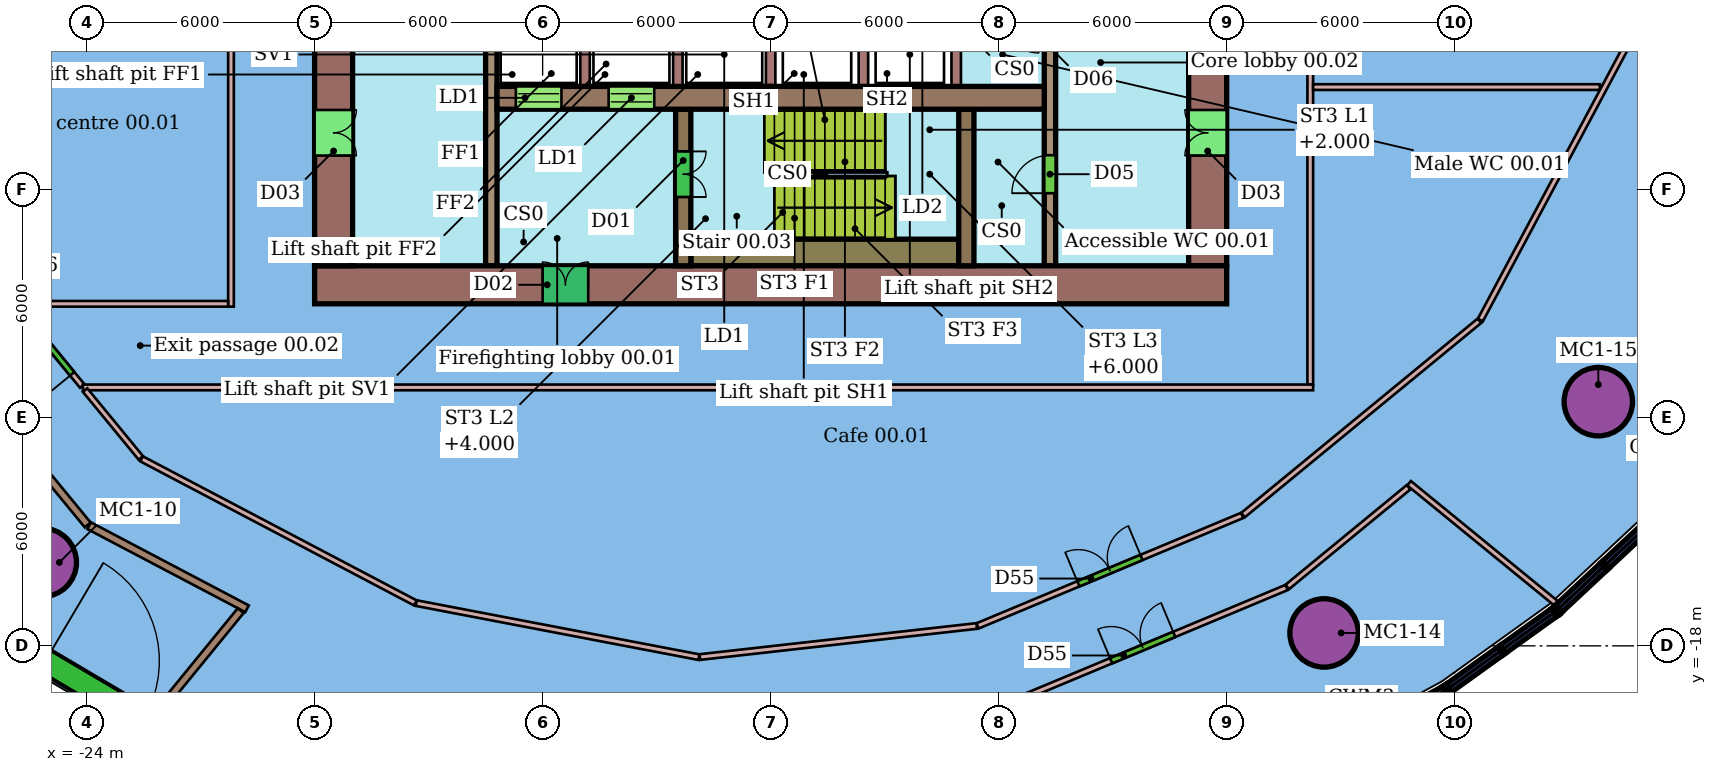
"""IFC4 building model, lengths in metres.
Left out: names, types, materials, properties, quantities, classifications, styles, units other than length and angle.
Written with IfcOpenShell. Run it as: python <this file> out.ifc"""

import sys

from ifc_helpers import new_model, si_unit, direction, frame, frame_2d, origin, origin_2d, place, context, subcontext, project, spatial, rectangle, hollow_circle, extrude, element, fill, save


model = new_model("IFC4")
c1 = context("Model", 3, precision=1e-05, world=origin(), true_north=direction((0.0, 1.0)))
c2 = subcontext(c1, "Body", "Model", "MODEL_VIEW")
j1 = project(units=[si_unit("LENGTHUNIT", "METRE"), si_unit("PLANEANGLEUNIT", "RADIAN")], contexts=[c1])
p1 = place(None, origin())
s1 = spatial("IfcSite", under=j1, at=p1, CompositionType="ELEMENT")
p2 = place(p1, origin())
s2 = spatial("IfcBuilding", under=s1, at=p2, CompositionType="ELEMENT")
p3 = place(p2, origin())
s3 = spatial("IfcBuildingStorey", under=s2, at=p3, CompositionType="ELEMENT", Elevation=0.0)
for number, where, z_axis, x_axis in (
    (1, (-25.166, -15.805, -2.0), (0.0, 0.0, 1.0), (1.0, 0.0, 0.0)),
    (2, (8.563, -17.66, -2.0), (0.0, 0.0, 1.0), (1.0, 0.0, 0.0)),
    (3, (15.78, -11.576, -2.0), (0.0, 0.0, 1.0), (1.0, 0.0, 0.0)),
):
    element("IfcColumn", number, at=place(p3, frame(where, z_axis=z_axis, x_axis=x_axis)), inside=s3, PredefinedType="COLUMN", context=c2, shape_type="SweptSolid", body=[
        extrude(hollow_circle(Radius=0.9, WallThickness=0.06, at=origin_2d()), origin(), (0.0, 0.0, 1.0), 9.8),
    ])
for number, where, z_axis, x_axis in (
    (4, (-20.2, -9.075, 0.0), (0.0, 0.0, 1.0), (0.0, 1.0, 0.0)),
    (5, (8.2, -11.125, 0.0), (0.0, 0.0, 1.0), (0.0, 1.0, 0.0)),
):
    element("IfcWall", number, at=place(p3, frame(where, z_axis=z_axis, x_axis=x_axis)), inside=s3, PredefinedType="PARTITIONING", context=c2, shape_type="SweptSolid", body=[
        extrude(rectangle(XDim=20.2, YDim=0.15, at=frame_2d((10.1, 0.0))), origin(), (0.0, 0.0, 1.0), 7.35),
    ])
p4 = place(p3, frame((-24.097, -11.2, 0.0), z_axis=(0.0, 0.0, 1.0), x_axis=(1.0, 0.0, 0.0)))
e6 = element("IfcWall", 6, at=p4, inside=s3, PredefinedType="PARTITIONING", context=c2, shape_type="SweptSolid", body=[
    extrude(rectangle(XDim=32.372, YDim=0.15, at=frame_2d((16.186, 0.0))), origin(), (0.0, 0.0, 1.0), 7.35),
])
p5 = place(p3, frame((-25.906, -9.0, 0.0), z_axis=(0.0, 0.0, 1.0), x_axis=(1.0, 0.0, 0.0)))
e7 = element("IfcWall", 7, at=p5, inside=s3, PredefinedType="PARTITIONING", context=c2, shape_type="SweptSolid", body=[
    extrude(rectangle(XDim=5.631, YDim=0.15, at=frame_2d((2.815, 0.0))), origin(), (0.0, 0.0, 1.0), 7.35),
])
p6 = place(p3, frame((-24.039, -11.271, 0.0), z_axis=(0.0, 0.0, 1.0), x_axis=(0.634980634047, -0.772528054109, 0.0)))
e8 = element("IfcWall", 8, at=p6, inside=s3, PredefinedType="PARTITIONING", context=c2, shape_type="SweptSolid", body=[
    extrude(rectangle(XDim=2.309, YDim=0.15, at=frame_2d((1.155, 0.0))), origin(), (0.0, 0.0, 1.0), 7.35),
])
p7 = place(p3, frame((8.275, -3.298, 0.0), z_axis=(0.0, 0.0, 1.0), x_axis=(1.0, 0.0, 0.0)))
e9 = element("IfcWall", 9, at=p7, inside=s3, PredefinedType="PARTITIONING", context=c2, shape_type="SweptSolid", body=[
    extrude(rectangle(XDim=7.546, YDim=0.15, at=frame_2d((3.773, 0.0))), origin(), (0.0, 0.0, 1.0), 7.35),
])
p8 = place(p3, frame((-0.553, -17.475, 0.0), z_axis=(0.0, 0.0, 1.0), x_axis=(0.922821127206, 0.38522872061, 0.0)))
e10 = element("IfcWall", 10, at=p8, inside=s3, PredefinedType="PARTITIONING", context=c2, shape_type="SweptSolid", body=[
    extrude(rectangle(XDim=7.545, YDim=0.15, at=frame_2d((3.773, 0.0))), origin(), (0.0, 0.0, 1.0), 7.35),
])
p9 = place(p8, frame((2.873, 0.0, 0.0)))
e11 = element("IfcOpeningElement", 11, at=p9, cuts=e10, PredefinedType="OPENING", context=c2, shape_type="SweptSolid", body=[
    extrude(rectangle(XDim=1.8, YDim=2.4, at=frame_2d((0.9, 1.2))), frame((0.0, 0.085, 0.0), z_axis=(0.0, -1.0, 0.0), x_axis=(1.0, 0.0, 0.0)), (0.0, 0.0, 1.0), 0.17),
])
p10 = place(p3, frame((-7.863, -18.295, 0.0), z_axis=(0.0, 0.0, 1.0), x_axis=(0.993762158865, 0.111520274427, 0.0)))
e12 = element("IfcWall", 12, at=p10, inside=s3, PredefinedType="PARTITIONING", context=c2, shape_type="SweptSolid", body=[
    extrude(rectangle(XDim=7.334, YDim=0.15, at=frame_2d((3.667, 0.0))), origin(), (0.0, 0.0, 1.0), 7.35),
])
p11 = place(p3, frame((-15.325, -16.875, 0.0), z_axis=(0.0, 0.0, 1.0), x_axis=(0.982205706766, -0.187808278828, 0.0)))
e13 = element("IfcWall", 13, at=p11, inside=s3, PredefinedType="PARTITIONING", context=c2, shape_type="SweptSolid", body=[
    extrude(rectangle(XDim=7.573, YDim=0.15, at=frame_2d((3.787, 0.0))), origin(), (0.0, 0.0, 1.0), 7.35),
])
p12 = place(p3, frame((-22.553, -13.079, 0.0), z_axis=(0.0, 0.0, 1.0), x_axis=(0.884926027541, -0.46573160273, 0.0)))
e14 = element("IfcWall", 14, at=p12, inside=s3, PredefinedType="PARTITIONING", context=c2, shape_type="SweptSolid", body=[
    extrude(rectangle(XDim=8.142, YDim=0.15, at=frame_2d((4.071, 0.0))), origin(), (0.0, 0.0, 1.0), 7.35),
])
p13 = place(p3, frame((12.676, -9.427, 0.0), z_axis=(0.0, 0.0, 1.0), x_axis=(0.470743396375, 0.882270171076, 0.0)))
e15 = element("IfcWall", 15, at=p13, inside=s3, PredefinedType="PARTITIONING", context=c2, shape_type="SweptSolid", body=[
    extrude(rectangle(XDim=8.493, YDim=0.15, at=frame_2d((4.247, 0.0))), origin(), (0.0, 0.0, 1.0), 7.35),
])
p14 = place(p3, frame((6.431, -14.559, 0.0), z_axis=(0.0, 0.0, 1.0), x_axis=(0.772569565922, 0.634930126716, 0.0)))
e16 = element("IfcWall", 16, at=p14, inside=s3, PredefinedType="PARTITIONING", context=c2, shape_type="SweptSolid", body=[
    extrude(rectangle(XDim=8.053, YDim=0.15, at=frame_2d((4.026, 0.0))), origin(), (0.0, 0.0, 1.0), 7.35),
])
p15 = place(p3, frame((-30.093, -7.371, 0.0), z_axis=(0.0, 0.0, 1.0), x_axis=(0.635024486896, -0.772492007106, 0.0)))
e17 = element("IfcWall", 17, at=p15, inside=s3, PredefinedType="PARTITIONING", context=c2, shape_type="SweptSolid", body=[
    extrude(rectangle(XDim=9.642, YDim=0.2, at=frame_2d((4.821, 0.0))), origin(), (0.0, 0.0, 1.0), 7.35),
])
p16 = place(p3, frame((-23.933, -14.839, 0.0), z_axis=(0.0, 0.0, 1.0), x_axis=(0.884946422315, -0.465692849023, 0.0)))
e18 = element("IfcWall", 18, at=p16, inside=s3, PredefinedType="PARTITIONING", context=c2, shape_type="SweptSolid", body=[
    extrude(rectangle(XDim=4.695, YDim=0.2, at=frame_2d((2.347, 0.0))), origin(), (0.0, 0.0, 1.0), 7.35),
])
p17 = place(p3, frame((-22.156, -19.781, 0.0), z_axis=(0.0, 0.0, 1.0), x_axis=(0.632598795389, 0.774479673118, 0.0)))
e19 = element("IfcWall", 19, at=p17, inside=s3, PredefinedType="PARTITIONING", context=c2, shape_type="SweptSolid", body=[
    extrude(rectangle(XDim=3.497, YDim=0.2, at=frame_2d((1.748, 0.0))), origin(), (0.0, 0.0, 1.0), 7.35),
])
p18 = place(p3, frame((0.004, -19.626, 0.0), z_axis=(0.0, 0.0, 1.0), x_axis=(0.922823237456, 0.385223665436, 0.0)))
e20 = element("IfcWall", 20, at=p18, inside=s3, PredefinedType="PARTITIONING", context=c2, shape_type="SweptSolid", body=[
    extrude(rectangle(XDim=8.207, YDim=0.15, at=frame_2d((4.103, 0.0))), origin(), (0.0, 0.0, 1.0), 7.35),
])
p19 = place(p18, frame((3.203, 0.0, 0.0)))
e21 = element("IfcOpeningElement", 21, at=p19, cuts=e20, PredefinedType="OPENING", context=c2, shape_type="SweptSolid", body=[
    extrude(rectangle(XDim=1.8, YDim=2.4, at=frame_2d((0.9, 1.2))), frame((0.0, 0.085, 0.0), z_axis=(0.0, -1.0, 0.0), x_axis=(1.0, 0.0, 0.0)), (0.0, 0.0, 1.0), 0.17),
])
p20 = place(p3, frame((7.594, -16.45, 0.0), z_axis=(0.0, 0.0, 1.0), x_axis=(0.772605153206, 0.634886822386, 0.0)))
e22 = element("IfcWall", 22, at=p20, inside=s3, PredefinedType="PARTITIONING", context=c2, shape_type="SweptSolid", body=[
    extrude(rectangle(XDim=4.132, YDim=0.15, at=frame_2d((2.066, 0.0))), origin(), (0.0, 0.0, 1.0), 7.35),
])
p21 = place(p3, frame((10.8, -13.721, 0.0), z_axis=(0.0, 0.0, 1.0), x_axis=(0.774493289837, -0.63258212431, 0.0)))
e23 = element("IfcWall", 23, at=p21, inside=s3, PredefinedType="PARTITIONING", context=c2, shape_type="SweptSolid", body=[
    extrude(rectangle(XDim=5.03, YDim=0.15, at=frame_2d((2.515, 0.0))), origin(), (0.0, 0.0, 1.0), 7.35),
])
p22 = place(p3, frame((-25.671, -18.053, 0.0), z_axis=(0.0, 0.0, 1.0), x_axis=(0.861017868942, -0.508574703818, 0.0)))
e24 = element("IfcWall", 24, at=p22, inside=s3, PredefinedType="SOLIDWALL", context=c2, shape_type="SweptSolid", body=[
    extrude(rectangle(XDim=4.363, YDim=0.6, at=frame_2d((2.181, 0.0))), origin(), (0.0, 0.0, 1.0), 7.4),
])
p23 = place(p22, frame((0.681, 0.0, 0.0)))
e25 = element("IfcOpeningElement", 25, at=p23, cuts=e24, PredefinedType="OPENING", context=c2, shape_type="SweptSolid", body=[
    extrude(rectangle(XDim=3.0, YDim=3.5, at=frame_2d((1.5, 1.75))), frame((0.0, 0.31, 0.0), z_axis=(0.0, -1.0, 0.0), x_axis=(1.0, 0.0, 0.0)), (0.0, 0.0, 1.0), 0.62),
])
p24 = place(p3, frame((-18.0, -8.5, -2.0), z_axis=(0.0, 0.0, 1.0), x_axis=(1.0, 0.0, 0.0)))
e26 = element("IfcWall", 26, at=p24, inside=s3, PredefinedType="SHEAR", context=c2, shape_type="SweptSolid", body=[
    extrude(rectangle(XDim=24.0, YDim=1.0, at=frame_2d((12.0, 0.0))), origin(), (0.0, 0.0, 1.0), 9.7),
])
p25 = place(p24, frame((6.0, 0.0, 2.0)))
e27 = element("IfcOpeningElement", 27, at=p25, cuts=e26, PredefinedType="OPENING", context=c2, shape_type="SweptSolid", body=[
    extrude(rectangle(XDim=1.2, YDim=2.1, at=frame_2d((0.6, 1.05))), frame((0.0, 0.51, 0.0), z_axis=(0.0, -1.0, 0.0), x_axis=(1.0, 0.0, 0.0)), (0.0, 0.0, 1.0), 1.02),
])
p26 = place(p3, frame((-17.5, 8.0, -2.0), z_axis=(0.0, 0.0, 1.0), x_axis=(0.0, -1.0, 0.0)))
e28 = element("IfcWall", 28, at=p26, inside=s3, PredefinedType="SHEAR", context=c2, shape_type="SweptSolid", body=[
    extrude(rectangle(XDim=16.0, YDim=1.0, at=frame_2d((8.0, 0.0))), origin(), (0.0, 0.0, 1.0), 9.7),
])
p27 = place(p26, frame((11.9, 0.0, 2.0)))
e29 = element("IfcOpeningElement", 29, at=p27, cuts=e28, PredefinedType="OPENING", context=c2, shape_type="SweptSolid", body=[
    extrude(rectangle(XDim=1.2, YDim=2.1, at=frame_2d((0.6, 1.05))), frame((0.0, 0.51, 0.0), z_axis=(0.0, -1.0, 0.0), x_axis=(1.0, 0.0, 0.0)), (0.0, 0.0, 1.0), 1.02),
])
p28 = place(p26, frame((2.9, 0.0, 2.0)))
e30 = element("IfcOpeningElement", 30, at=p28, cuts=e28, PredefinedType="OPENING", context=c2, shape_type="SweptSolid", body=[
    extrude(rectangle(XDim=1.2, YDim=2.1, at=frame_2d((0.6, 1.05))), frame((0.0, 0.51, 0.0), z_axis=(0.0, -1.0, 0.0), x_axis=(1.0, 0.0, 0.0)), (0.0, 0.0, 1.0), 1.02),
])
p29 = place(p3, frame((5.5, -8.0, -2.0), z_axis=(0.0, 0.0, 1.0), x_axis=(0.0, 1.0, 0.0)))
e31 = element("IfcWall", 31, at=p29, inside=s3, PredefinedType="SHEAR", context=c2, shape_type="SweptSolid", body=[
    extrude(rectangle(XDim=16.0, YDim=1.0, at=frame_2d((8.0, 0.0))), origin(), (0.0, 0.0, 1.0), 9.7),
])
p30 = place(p29, frame((2.9, 0.0, 2.0)))
e32 = element("IfcOpeningElement", 32, at=p30, cuts=e31, PredefinedType="OPENING", context=c2, shape_type="SweptSolid", body=[
    extrude(rectangle(XDim=1.2, YDim=2.1, at=frame_2d((0.6, 1.05))), frame((0.0, 0.51, 0.0), z_axis=(0.0, -1.0, 0.0), x_axis=(1.0, 0.0, 0.0)), (0.0, 0.0, 1.0), 1.02),
])
p31 = place(p29, frame((11.9, 0.0, 2.0)))
e33 = element("IfcOpeningElement", 33, at=p31, cuts=e31, PredefinedType="OPENING", context=c2, shape_type="SweptSolid", body=[
    extrude(rectangle(XDim=1.2, YDim=2.1, at=frame_2d((0.6, 1.05))), frame((0.0, 0.51, 0.0), z_axis=(0.0, -1.0, 0.0), x_axis=(1.0, 0.0, 0.0)), (0.0, 0.0, 1.0), 1.02),
])
p32 = place(p3, frame((-13.2, -3.58, -2.0), z_axis=(0.0, 0.0, 1.0), x_axis=(1.0, 0.0, 0.0)))
e34 = element("IfcWall", 34, at=p32, inside=s3, PredefinedType="SHEAR", context=c2, shape_type="SweptSolid", body=[
    extrude(rectangle(XDim=7.2, YDim=0.6, at=frame_2d((3.6, 0.0))), origin(), (0.0, 0.0, 1.0), 9.7),
])
p33 = place(p32, frame((0.496, 0.0, 2.0)))
e35 = element("IfcOpeningElement", 35, at=p33, cuts=e34, PredefinedType="OPENING", context=c2, shape_type="SweptSolid", body=[
    extrude(rectangle(XDim=1.2, YDim=2.1, at=frame_2d((0.6, 1.05))), frame((0.0, 0.31, 0.0), z_axis=(0.0, -1.0, 0.0), x_axis=(1.0, 0.0, 0.0)), (0.0, 0.0, 1.0), 0.62),
])
p34 = place(p32, frame((2.938, 0.0, 2.0)))
e36 = element("IfcOpeningElement", 36, at=p34, cuts=e34, PredefinedType="OPENING", context=c2, shape_type="SweptSolid", body=[
    extrude(rectangle(XDim=1.2, YDim=2.1, at=frame_2d((0.6, 1.05))), frame((0.0, 0.31, 0.0), z_axis=(0.0, -1.0, 0.0), x_axis=(1.0, 0.0, 0.0)), (0.0, 0.0, 1.0), 0.62),
])
p35 = place(p3, frame((-6.0, -3.58, -2.0), z_axis=(0.0, 0.0, 1.0), x_axis=(1.0, 0.0, 0.0)))
e37 = element("IfcWall", 37, at=p35, inside=s3, PredefinedType="SHEAR", context=c2, shape_type="SweptSolid", body=[
    extrude(rectangle(XDim=7.2, YDim=0.6, at=frame_2d((3.6, 0.0))), origin(), (0.0, 0.0, 1.0), 9.7),
])
p36 = place(p3, frame((-13.35, 8.0, -2.0), z_axis=(0.0, 0.0, 1.0), x_axis=(0.0, -1.0, 0.0)))
e38 = element("IfcWall", 38, at=p36, inside=s3, PredefinedType="SHEAR", context=c2, shape_type="SweptSolid", body=[
    extrude(rectangle(XDim=16.0, YDim=0.3, at=frame_2d((8.0, 0.0))), origin(), (0.0, 0.0, 1.0), 9.7),
])
p37 = place(p36, frame((7.25, 0.0, 2.0)))
e39 = element("IfcOpeningElement", 39, at=p37, cuts=e38, PredefinedType="OPENING", context=c2, shape_type="SweptSolid", body=[
    extrude(rectangle(XDim=1.5, YDim=2.1, at=frame_2d((0.75, 1.05))), frame((0.0, 0.16, 0.0), z_axis=(0.0, -1.0, 0.0), x_axis=(1.0, 0.0, 0.0)), (0.0, 0.0, 1.0), 0.32),
])
p38 = place(p3, frame((1.35, -8.0, -2.0), z_axis=(0.0, 0.0, 1.0), x_axis=(0.0, 1.0, 0.0)))
e40 = element("IfcWall", 40, at=p38, inside=s3, PredefinedType="SHEAR", context=c2, shape_type="SweptSolid", body=[
    extrude(rectangle(XDim=16.0, YDim=0.3, at=frame_2d((8.0, 0.0))), origin(), (0.0, 0.0, 1.0), 9.7),
])
p39 = place(p38, frame((1.91, 0.0, 2.0)))
e41 = element("IfcOpeningElement", 41, at=p39, cuts=e40, PredefinedType="OPENING", context=c2, shape_type="SweptSolid", body=[
    extrude(rectangle(XDim=1.0, YDim=2.1, at=frame_2d((0.5, 1.05))), frame((0.0, 0.16, 0.0), z_axis=(0.0, -1.0, 0.0), x_axis=(1.0, 0.0, 0.0)), (0.0, 0.0, 1.0), 0.32),
])
p40 = place(p38, frame((7.25, 0.0, 2.0)))
e42 = element("IfcOpeningElement", 42, at=p40, cuts=e40, PredefinedType="OPENING", context=c2, shape_type="SweptSolid", body=[
    extrude(rectangle(XDim=1.5, YDim=2.1, at=frame_2d((0.75, 1.05))), frame((0.0, 0.16, 0.0), z_axis=(0.0, -1.0, 0.0), x_axis=(1.0, 0.0, 0.0)), (0.0, 0.0, 1.0), 0.32),
])
p41 = place(p3, frame((-8.3, -3.88, -2.0), z_axis=(0.0, 0.0, 1.0), x_axis=(0.0, -1.0, 0.0)))
e43 = element("IfcWall", 43, at=p41, inside=s3, PredefinedType="SHEAR", context=c2, shape_type="SweptSolid", body=[
    extrude(rectangle(XDim=4.12, YDim=0.4, at=frame_2d((2.06, 0.0))), origin(), (0.0, 0.0, 1.0), 9.7),
])
p42 = place(p41, frame((1.11, 0.0, 2.0)))
e44 = element("IfcOpeningElement", 44, at=p42, cuts=e43, PredefinedType="OPENING", context=c2, shape_type="SweptSolid", body=[
    extrude(rectangle(XDim=1.2, YDim=2.1, at=frame_2d((0.6, 1.05))), frame((0.0, 0.21, 0.0), z_axis=(0.0, -1.0, 0.0), x_axis=(1.0, 0.0, 0.0)), (0.0, 0.0, 1.0), 0.42),
])
p43 = place(p3, frame((-0.85, -3.88, -2.0), z_axis=(0.0, 0.0, 1.0), x_axis=(0.0, -1.0, 0.0)))
e45 = element("IfcWall", 45, at=p43, inside=s3, PredefinedType="SHEAR", context=c2, shape_type="SweptSolid", body=[
    extrude(rectangle(XDim=4.12, YDim=0.4, at=frame_2d((2.06, 0.0))), origin(), (0.0, 0.0, 1.0), 9.7),
])
p44 = place(p3, frame((-8.1, -7.65, -2.0), z_axis=(0.0, 0.0, 1.0), x_axis=(1.0, 0.0, 0.0)))
e46 = element("IfcWall", 46, at=p44, inside=s3, PredefinedType="SHEAR", context=c2, shape_type="SweptSolid", body=[
    extrude(rectangle(XDim=7.05, YDim=0.7, at=frame_2d((3.525, 0.0))), origin(), (0.0, 0.0, 1.0), 9.7),
])
for number, where, z_axis, x_axis in (
    (47, (-10.883, -1.6, -2.0), (0.0, 0.0, 1.0), (0.0, -1.0, 0.0)),
    (48, (-8.442, -1.6, -2.0), (0.0, 0.0, 1.0), (0.0, -1.0, 0.0)),
    (49, (-6.0, -1.6, -2.0), (0.0, 0.0, 1.0), (0.0, -1.0, 0.0)),
    (50, (-3.558, -1.6, -2.0), (0.0, 0.0, 1.0), (0.0, -1.0, 0.0)),
    (51, (-1.117, -1.6, -2.0), (0.0, 0.0, 1.0), (0.0, -1.0, 0.0)),
):
    element("IfcWall", number, at=place(p3, frame(where, z_axis=z_axis, x_axis=x_axis)), inside=s3, PredefinedType="SHEAR", context=c2, shape_type="SweptSolid", body=[
        extrude(rectangle(XDim=1.68, YDim=0.25, at=frame_2d((0.84, 0.0))), origin(), (0.0, 0.0, 1.0), 9.7),
    ])
p45 = place(p3, frame((-24.115, -11.163, 0.0), z_axis=(0.0, 0.0, 1.0), x_axis=(-0.63506228811, 0.772460931193, 0.0)))
e52 = element("IfcWall", 52, at=p45, inside=s3, PredefinedType="PARTITIONING", context=c2, shape_type="SweptSolid", body=[
    extrude(rectangle(XDim=2.628, YDim=0.15, at=frame_2d((1.314, 0.0))), origin(), (0.0, 0.0, 1.0), 7.35),
])
p46 = place(p45, frame((0.414, 0.0, 0.0)))
e53 = element("IfcOpeningElement", 53, at=p46, cuts=e52, PredefinedType="OPENING", context=c2, shape_type="SweptSolid", body=[
    extrude(rectangle(XDim=1.8, YDim=2.4, at=frame_2d((0.9, 1.2))), frame((0.0, 0.085, 0.0), z_axis=(0.0, -1.0, 0.0), x_axis=(1.0, 0.0, 0.0)), (0.0, 0.0, 1.0), 0.17),
])
p47 = place(p9, origin())
e54 = element("IfcDoor", 54, at=p47, inside=s3, OperationType="DOUBLE_DOOR_SINGLE_SWING", PredefinedType="DOOR", context=c2, shape_type="SweptSolid", body=[
    extrude(rectangle(XDim=1.8, YDim=2.4, at=frame_2d((0.9, 1.2))), frame((0.0, 0.025, 0.0), z_axis=(0.0, -1.0, 0.0), x_axis=(1.0, 0.0, 0.0)), (0.0, 0.0, 1.0), 0.05),
])
fill(e11, e54)
p48 = place(p19, origin())
e55 = element("IfcDoor", 55, at=p48, inside=s3, OperationType="DOUBLE_DOOR_SINGLE_SWING", PredefinedType="DOOR", context=c2, shape_type="SweptSolid", body=[
    extrude(rectangle(XDim=1.8, YDim=2.4, at=frame_2d((0.9, 1.2))), frame((0.0, 0.025, 0.0), z_axis=(0.0, -1.0, 0.0), x_axis=(1.0, 0.0, 0.0)), (0.0, 0.0, 1.0), 0.05),
])
fill(e21, e55)
p49 = place(p23, origin())
e56 = element("IfcDoor", 56, at=p49, inside=s3, OperationType="ROLLINGUP", PredefinedType="GATE", context=c2, shape_type="SweptSolid", body=[
    extrude(rectangle(XDim=3.0, YDim=3.5, at=frame_2d((1.5, 1.75))), frame((0.0, 0.025, 0.0), z_axis=(0.0, -1.0, 0.0), x_axis=(1.0, 0.0, 0.0)), (0.0, 0.0, 1.0), 0.05),
])
fill(e25, e56)
p50 = place(p25, origin())
e57 = element("IfcDoor", 57, at=p50, inside=s3, OperationType="DOUBLE_DOOR_SINGLE_SWING", PredefinedType="NOTDEFINED", context=c2, shape_type="SweptSolid", body=[
    extrude(rectangle(XDim=1.2, YDim=2.1, at=frame_2d((0.6, 1.05))), frame((0.0, 0.025, 0.0), z_axis=(0.0, -1.0, 0.0), x_axis=(1.0, 0.0, 0.0)), (0.0, 0.0, 1.0), 0.05),
])
fill(e27, e57)
p51 = place(p27, origin())
e58 = element("IfcDoor", 58, at=p51, inside=s3, OperationType="DOUBLE_DOOR_SINGLE_SWING", PredefinedType="NOTDEFINED", context=c2, shape_type="SweptSolid", body=[
    extrude(rectangle(XDim=1.2, YDim=2.1, at=frame_2d((0.6, 1.05))), frame((0.0, 0.025, 0.0), z_axis=(0.0, -1.0, 0.0), x_axis=(1.0, 0.0, 0.0)), (0.0, 0.0, 1.0), 0.05),
])
fill(e29, e58)
p52 = place(p30, origin())
e59 = element("IfcDoor", 59, at=p52, inside=s3, OperationType="DOUBLE_DOOR_SINGLE_SWING", PredefinedType="NOTDEFINED", context=c2, shape_type="SweptSolid", body=[
    extrude(rectangle(XDim=1.2, YDim=2.1, at=frame_2d((0.6, 1.05))), frame((0.0, 0.025, 0.0), z_axis=(0.0, -1.0, 0.0), x_axis=(1.0, 0.0, 0.0)), (0.0, 0.0, 1.0), 0.05),
])
fill(e32, e59)
p53 = place(p33, origin())
e60 = element("IfcDoor", 60, at=p53, inside=s3, OperationType="DOUBLE_DOOR_SLIDING", PredefinedType="NOTDEFINED", context=c2, shape_type="SweptSolid", body=[
    extrude(rectangle(XDim=1.2, YDim=2.1, at=frame_2d((0.6, 1.05))), frame((0.0, 0.025, 0.0), z_axis=(0.0, -1.0, 0.0), x_axis=(1.0, 0.0, 0.0)), (0.0, 0.0, 1.0), 0.05),
])
fill(e35, e60)
p54 = place(p34, origin())
e61 = element("IfcDoor", 61, at=p54, inside=s3, OperationType="DOUBLE_DOOR_SLIDING", PredefinedType="NOTDEFINED", context=c2, shape_type="SweptSolid", body=[
    extrude(rectangle(XDim=1.2, YDim=2.1, at=frame_2d((0.6, 1.05))), frame((0.0, 0.025, 0.0), z_axis=(0.0, -1.0, 0.0), x_axis=(1.0, 0.0, 0.0)), (0.0, 0.0, 1.0), 0.05),
])
fill(e36, e61)
p55 = place(p39, origin())
e62 = element("IfcDoor", 62, at=p55, inside=s3, OperationType="SINGLE_SWING_LEFT", PredefinedType="NOTDEFINED", context=c2, shape_type="SweptSolid", body=[
    extrude(rectangle(XDim=1.0, YDim=2.1, at=frame_2d((0.5, 1.05))), frame((0.0, 0.025, 0.0), z_axis=(0.0, -1.0, 0.0), x_axis=(1.0, 0.0, 0.0)), (0.0, 0.0, 1.0), 0.05),
])
fill(e41, e62)
p56 = place(p42, origin())
e63 = element("IfcDoor", 63, at=p56, inside=s3, OperationType="DOUBLE_DOOR_SINGLE_SWING", PredefinedType="NOTDEFINED", context=c2, shape_type="SweptSolid", body=[
    extrude(rectangle(XDim=1.2, YDim=2.1, at=frame_2d((0.6, 1.05))), frame((0.0, 0.025, 0.0), z_axis=(0.0, -1.0, 0.0), x_axis=(1.0, 0.0, 0.0)), (0.0, 0.0, 1.0), 0.05),
])
fill(e44, e63)
p57 = place(p46, origin())
e64 = element("IfcDoor", 64, at=p57, inside=s3, OperationType="DOUBLE_DOOR_SINGLE_SWING", PredefinedType="DOOR", context=c2, shape_type="SweptSolid", body=[
    extrude(rectangle(XDim=1.8, YDim=2.4, at=frame_2d((0.9, 1.2))), frame((0.0, 0.025, 0.0), z_axis=(0.0, -1.0, 0.0), x_axis=(1.0, 0.0, 0.0)), (0.0, 0.0, 1.0), 0.05),
])
fill(e53, e64)
save(model, sys.argv[1])
